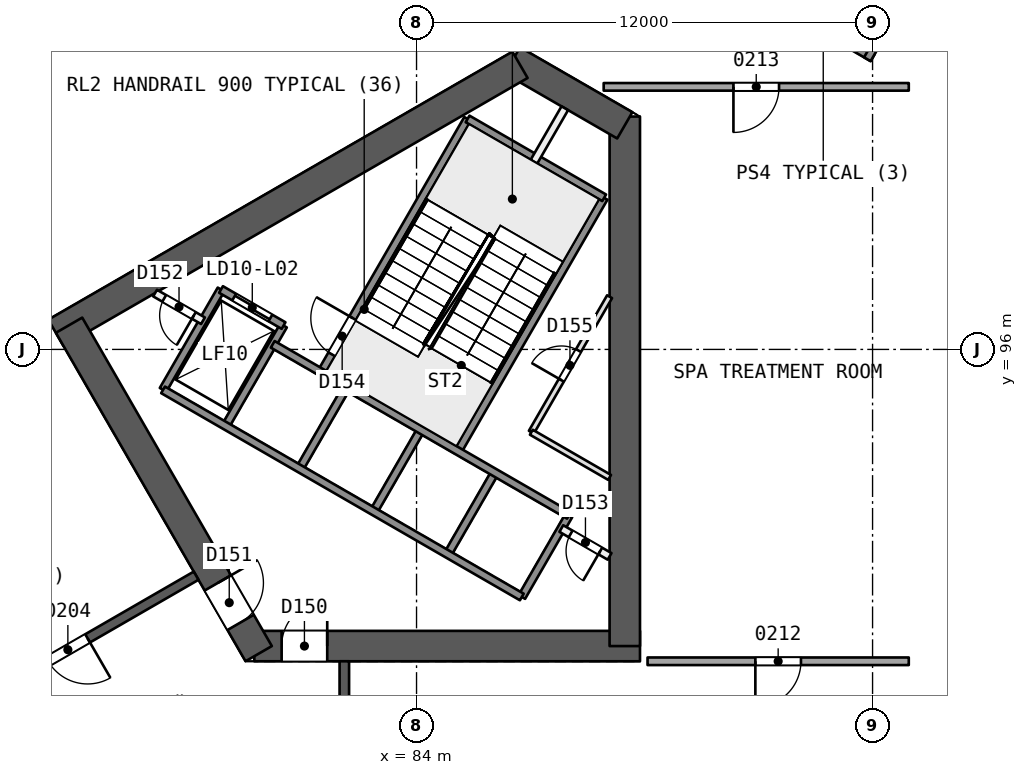
"""IFC4 building model, lengths in metres.
Left out: names, types, materials, properties, quantities, classifications, styles, units other than length and angle.
Written with IfcOpenShell. Run it as: python <this file> out.ifc"""

import sys

from ifc_helpers import new_model, si_unit, direction, frame, frame_2d, origin, place, context, subcontext, project, spatial, rectangle, extrude, element, fill, save


model = new_model("IFC4")
c1 = context("Model", 3, precision=1e-05, world=origin(), true_north=direction((0.0, 1.0)))
c2 = subcontext(c1, "Body", "Model", "MODEL_VIEW")
j1 = project(units=[si_unit("LENGTHUNIT", "METRE"), si_unit("PLANEANGLEUNIT", "RADIAN")], contexts=[c1])
p1 = place(None, origin())
s1 = spatial("IfcSite", under=j1, at=p1, CompositionType="ELEMENT")
p2 = place(p1, origin())
s2 = spatial("IfcBuilding", under=s1, at=p2, CompositionType="ELEMENT")
p3 = place(p2, frame((0.0, 0.0, 15.0)))
s3 = spatial("IfcBuildingStorey", under=s2, at=p3, CompositionType="ELEMENT", Elevation=15.0)
p4 = place(p3, frame((79.731, 88.194, 0.0), z_axis=(0.0, 0.0, 1.0), x_axis=(1.0, 0.0, 0.0)))
e1 = element("IfcWall", 1, at=p4, inside=s3, PredefinedType="SHEAR", context=c2, shape_type="SweptSolid", body=[
    extrude(rectangle(XDim=10.149, YDim=0.8, at=frame_2d((5.074, 0.0))), origin(), (0.0, 0.0, 1.0), 5.4),
])
p5 = place(p4, frame((0.719, 0.0, 0.0)))
e2 = element("IfcOpeningElement", 2, at=p5, cuts=e1, PredefinedType="OPENING", context=c2, shape_type="SweptSolid", body=[
    extrude(rectangle(XDim=1.2, YDim=2.1, at=frame_2d((0.6, 1.05))), frame((0.0, 0.411, 0.0), z_axis=(0.0, -1.0, 0.0), x_axis=(1.0, 0.0, 0.0)), (0.0, 0.0, 1.0), 0.821),
])
p6 = place(p3, frame((89.48, 88.194, 0.0), z_axis=(0.0, 0.0, 1.0), x_axis=(0.0, 1.0, 0.0)))
e3 = element("IfcWall", 3, at=p6, inside=s3, PredefinedType="SHEAR", context=c2, shape_type="SweptSolid", body=[
    extrude(rectangle(XDim=13.933, YDim=0.8, at=frame_2d((6.967, 0.0))), origin(), (0.0, 0.0, 1.0), 5.4),
])
p7 = place(p3, frame((89.48, 101.897, 0.0), z_axis=(0.0, 0.0, 1.0), x_axis=(-0.866034355626, 0.499984494636, 0.0)))
e4 = element("IfcWall", 4, at=p7, inside=s3, PredefinedType="SHEAR", context=c2, shape_type="SweptSolid", body=[
    extrude(rectangle(XDim=3.414, YDim=0.8, at=frame_2d((1.707, 0.0))), origin(), (0.0, 0.0, 1.0), 5.4),
])
p8 = place(p3, frame((86.723, 103.488, 0.0), z_axis=(0.0, 0.0, 1.0), x_axis=(-0.866032504327, -0.499987701298, 0.0)))
e5 = element("IfcWall", 5, at=p8, inside=s3, PredefinedType="SHEAR", context=c2, shape_type="SweptSolid", body=[
    extrude(rectangle(XDim=14.102, YDim=0.8, at=frame_2d((7.051, 0.0))), origin(), (0.0, 0.0, 1.0), 5.4),
])
p9 = place(p3, frame((74.856, 96.637, 0.0), z_axis=(0.0, 0.0, 1.0), x_axis=(0.499993500917, -0.866029155999, 0.0)))
e6 = element("IfcWall", 6, at=p9, inside=s3, PredefinedType="SHEAR", context=c2, shape_type="SweptSolid", body=[
    extrude(rectangle(XDim=9.98, YDim=0.8, at=frame_2d((4.99, 0.0))), origin(), (0.0, 0.0, 1.0), 5.4),
])
p10 = place(p9, frame((7.83, 0.0, 0.0)))
e7 = element("IfcOpeningElement", 7, at=p10, cuts=e6, PredefinedType="OPENING", context=c2, shape_type="SweptSolid", body=[
    extrude(rectangle(XDim=1.2, YDim=2.1, at=frame_2d((0.6, 1.05))), frame((0.0, 0.411, 0.0), z_axis=(0.0, -1.0, 0.0), x_axis=(1.0, 0.0, 0.0)), (0.0, 0.0, 1.0), 0.821),
])
p11 = place(p3, frame((82.1, 72.206, 0.0), z_axis=(0.0, 0.0, 1.0), x_axis=(0.0, 1.0, 0.0)))
e8 = element("IfcWall", 8, at=p11, inside=s3, PredefinedType="SHEAR", context=c2, shape_type="SweptSolid", body=[
    extrude(rectangle(XDim=15.588, YDim=0.25, at=frame_2d((7.794, 0.0))), origin(), (0.0, 0.0, 1.0), 5.0),
])
p12 = place(p11, frame((2.05, 0.0, 0.0)))
e9 = element("IfcOpeningElement", 9, at=p12, cuts=e8, PredefinedType="OPENING", context=c2, shape_type="SweptSolid", body=[
    extrude(rectangle(XDim=1.2, YDim=2.4, at=frame_2d((0.6, 1.2))), frame((0.0, 0.135, 0.0), z_axis=(0.0, -1.0, 0.0), x_axis=(1.0, 0.0, 0.0)), (0.0, 0.0, 1.0), 0.271),
])
p13 = place(p11, frame((7.272, 0.0, 0.0)))
e10 = element("IfcOpeningElement", 10, at=p13, cuts=e8, PredefinedType="OPENING", context=c2, shape_type="SweptSolid", body=[
    extrude(rectangle(XDim=1.2, YDim=2.4, at=frame_2d((0.6, 1.2))), frame((0.0, 0.135, 0.0), z_axis=(0.0, -1.0, 0.0), x_axis=(1.0, 0.0, 0.0)), (0.0, 0.0, 1.0), 0.271),
])
p14 = place(p11, frame((12.417, 0.0, 0.0)))
e11 = element("IfcOpeningElement", 11, at=p14, cuts=e8, PredefinedType="OPENING", context=c2, shape_type="SweptSolid", body=[
    extrude(rectangle(XDim=1.2, YDim=2.4, at=frame_2d((0.6, 1.2))), frame((0.0, 0.135, 0.0), z_axis=(0.0, -1.0, 0.0), x_axis=(1.0, 0.0, 0.0)), (0.0, 0.0, 1.0), 0.271),
])
p15 = place(p3, frame((78.2, 90.046, 0.0), z_axis=(0.0, 0.0, 1.0), x_axis=(-0.866026492143, -0.499998114903, 0.0)))
e12 = element("IfcWall", 12, at=p15, inside=s3, PredefinedType="SHEAR", context=c2, shape_type="SweptSolid", body=[
    extrude(rectangle(XDim=15.588, YDim=0.25, at=frame_2d((7.794, 0.0))), origin(), (0.0, 0.0, 1.0), 5.0),
])
p16 = place(p15, frame((3.297, 0.0, 0.0)))
e13 = element("IfcOpeningElement", 13, at=p16, cuts=e12, PredefinedType="OPENING", context=c2, shape_type="SweptSolid", body=[
    extrude(rectangle(XDim=1.2, YDim=2.4, at=frame_2d((0.6, 1.2))), frame((0.0, 0.135, 0.0), z_axis=(0.0, -1.0, 0.0), x_axis=(1.0, 0.0, 0.0)), (0.0, 0.0, 1.0), 0.271),
])
p17 = place(p15, frame((8.046, 0.0, 0.0)))
e14 = element("IfcOpeningElement", 14, at=p17, cuts=e12, PredefinedType="OPENING", context=c2, shape_type="SweptSolid", body=[
    extrude(rectangle(XDim=0.9, YDim=2.1, at=frame_2d((0.45, 1.05))), frame((0.0, 0.135, 0.0), z_axis=(0.0, -1.0, 0.0), x_axis=(1.0, 0.0, 0.0)), (0.0, 0.0, 1.0), 0.271),
])
p18 = place(p15, frame((9.449, 0.0, 0.0)))
e15 = element("IfcOpeningElement", 15, at=p18, cuts=e12, PredefinedType="OPENING", context=c2, shape_type="SweptSolid", body=[
    extrude(rectangle(XDim=0.9, YDim=2.1, at=frame_2d((0.45, 1.05))), frame((0.0, 0.135, 0.0), z_axis=(0.0, -1.0, 0.0), x_axis=(1.0, 0.0, 0.0)), (0.0, 0.0, 1.0), 0.271),
])
p19 = place(p15, frame((11.085, 0.0, 0.0)))
e16 = element("IfcOpeningElement", 16, at=p19, cuts=e12, PredefinedType="OPENING", context=c2, shape_type="SweptSolid", body=[
    extrude(rectangle(XDim=0.9, YDim=2.1, at=frame_2d((0.45, 1.05))), frame((0.0, 0.135, 0.0), z_axis=(0.0, -1.0, 0.0), x_axis=(1.0, 0.0, 0.0)), (0.0, 0.0, 1.0), 0.271),
])
p20 = place(p15, frame((13.43, 0.0, 0.0)))
e17 = element("IfcOpeningElement", 17, at=p20, cuts=e12, PredefinedType="OPENING", context=c2, shape_type="SweptSolid", body=[
    extrude(rectangle(XDim=1.2, YDim=2.4, at=frame_2d((0.6, 1.2))), frame((0.0, 0.135, 0.0), z_axis=(0.0, -1.0, 0.0), x_axis=(1.0, 0.0, 0.0)), (0.0, 0.0, 1.0), 0.271),
])
p21 = place(p3, frame((96.953, 87.794, 0.0), z_axis=(0.0, 0.0, 1.0), x_axis=(-1.0, 0.0, 0.0)))
e18 = element("IfcWall", 18, at=p21, inside=s3, PredefinedType="PARTITIONING", context=c2, shape_type="SweptSolid", body=[
    extrude(rectangle(XDim=6.874, YDim=0.2, at=frame_2d((3.437, 0.0))), origin(), (0.0, 0.0, 1.0), 5.0),
])
p22 = place(p21, frame((2.837, 0.0, 0.0)))
e19 = element("IfcOpeningElement", 19, at=p22, cuts=e18, PredefinedType="OPENING", context=c2, shape_type="SweptSolid", body=[
    extrude(rectangle(XDim=1.2, YDim=2.4, at=frame_2d((0.6, 1.2))), frame((0.0, 0.11, 0.0), z_axis=(0.0, -1.0, 0.0), x_axis=(1.0, 0.0, 0.0)), (0.0, 0.0, 1.0), 0.221),
])
p23 = place(p3, frame((96.953, 102.909, 0.0), z_axis=(0.0, 0.0, 1.0), x_axis=(-1.0, 0.0, 0.0)))
e20 = element("IfcWall", 20, at=p23, inside=s3, PredefinedType="PARTITIONING", context=c2, shape_type="SweptSolid", body=[
    extrude(rectangle(XDim=8.028, YDim=0.2, at=frame_2d((4.014, 0.0))), origin(), (0.0, 0.0, 1.0), 5.0),
])
p24 = place(p23, frame((3.414, 0.0, 0.0)))
e21 = element("IfcOpeningElement", 21, at=p24, cuts=e20, PredefinedType="OPENING", context=c2, shape_type="SweptSolid", body=[
    extrude(rectangle(XDim=1.2, YDim=2.4, at=frame_2d((0.6, 1.2))), frame((0.0, 0.11, 0.0), z_axis=(0.0, -1.0, 0.0), x_axis=(1.0, 0.0, 0.0)), (0.0, 0.0, 1.0), 0.221),
])
p25 = place(p3, frame((26.66, 85.0, 0.0), z_axis=(0.0, 0.0, 1.0), x_axis=(0.866025599265, 0.499999661418, 0.0)))
e22 = element("IfcWall", 22, at=p25, inside=s3, PredefinedType="SOLIDWALL", context=c2, shape_type="SweptSolid", body=[
    extrude(rectangle(XDim=78.727, YDim=0.4, at=frame_2d((39.364, 0.0))), origin(), (0.0, 0.0, 1.0), 5.0),
])
p26 = place(p25, frame((42.061, 0.0, 0.9)))
e23 = element("IfcOpeningElement", 23, at=p26, cuts=e22, PredefinedType="OPENING", context=c2, shape_type="SweptSolid", body=[
    extrude(rectangle(XDim=2.4, YDim=2.4, at=frame_2d((1.2, 1.2))), frame((0.0, 0.21, 0.0), z_axis=(0.0, -1.0, 0.0), x_axis=(1.0, 0.0, 0.0)), (0.0, 0.0, 1.0), 0.421),
])
p27 = place(p25, frame((34.267, 0.0, 0.9)))
e24 = element("IfcOpeningElement", 24, at=p27, cuts=e22, PredefinedType="OPENING", context=c2, shape_type="SweptSolid", body=[
    extrude(rectangle(XDim=2.4, YDim=2.4, at=frame_2d((1.2, 1.2))), frame((0.0, 0.21, 0.0), z_axis=(0.0, -1.0, 0.0), x_axis=(1.0, 0.0, 0.0)), (0.0, 0.0, 1.0), 0.421),
])
p28 = place(p3, frame((86.77, 89.486, 0.0), z_axis=(0.0, 0.0, 1.0), x_axis=(0.499961042966, 0.86604789447, 0.0)))
e25 = element("IfcWall", 25, at=p28, inside=s3, PredefinedType="SOLIDWALL", context=c2, shape_type="SweptSolid", body=[
    extrude(rectangle(XDim=2.48, YDim=0.2, at=frame_2d((1.24, 0.0))), origin(), (0.0, 0.0, 1.0), 5.0),
])
p29 = place(p3, frame((87.021, 93.821, 0.0), z_axis=(0.0, 0.0, 1.0), x_axis=(0.500028662945, 0.866008854593, 0.0)))
e26 = element("IfcWall", 26, at=p29, inside=s3, PredefinedType="PARTITIONING", context=c2, shape_type="SweptSolid", body=[
    extrude(rectangle(XDim=4.118, YDim=0.15, at=frame_2d((2.059, 0.0))), origin(), (0.0, 0.0, 1.0), 5.0),
])
p30 = place(p29, frame((1.582, 0.0, 0.0)))
e27 = element("IfcOpeningElement", 27, at=p30, cuts=e26, PredefinedType="OPENING", context=c2, shape_type="SweptSolid", body=[
    extrude(rectangle(XDim=0.9, YDim=2.1, at=frame_2d((0.45, 1.05))), frame((0.0, 0.085, 0.0), z_axis=(0.0, -1.0, 0.0), x_axis=(1.0, 0.0, 0.0)), (0.0, 0.0, 1.0), 0.171),
])
p31 = place(p3, frame((84.821, 90.611, 0.0), z_axis=(0.0, 0.0, 1.0), x_axis=(0.499961042966, 0.86604789447, 0.0)))
e28 = element("IfcWall", 28, at=p31, inside=s3, PredefinedType="SOLIDWALL", context=c2, shape_type="SweptSolid", body=[
    extrude(rectangle(XDim=2.48, YDim=0.2, at=frame_2d((1.24, 0.0))), origin(), (0.0, 0.0, 1.0), 5.0),
])
p32 = place(p3, frame((85.087, 93.321, 0.0), z_axis=(0.0, 0.0, 1.0), x_axis=(0.500019787375, 0.866013979237, 0.0)))
e29 = element("IfcWall", 29, at=p32, inside=s3, PredefinedType="SOLIDWALL", context=c2, shape_type="SweptSolid", body=[
    extrude(rectangle(XDim=7.7, YDim=0.2, at=frame_2d((3.85, 0.0))), origin(), (0.0, 0.0, 1.0), 5.0),
])
p33 = place(p3, frame((82.873, 91.736, 0.0), z_axis=(0.0, 0.0, 1.0), x_axis=(0.499961042966, 0.86604789447, 0.0)))
e30 = element("IfcWall", 30, at=p33, inside=s3, PredefinedType="SOLIDWALL", context=c2, shape_type="SweptSolid", body=[
    extrude(rectangle(XDim=2.48, YDim=0.2, at=frame_2d((1.24, 0.0))), origin(), (0.0, 0.0, 1.0), 5.0),
])
p34 = place(p3, frame((87.09, 100.94, 0.0), z_axis=(0.0, 0.0, 1.0), x_axis=(0.499956811548, 0.866050337213, 0.0)))
e31 = element("IfcWall", 31, at=p34, inside=s3, PredefinedType="PARTITIONING", context=c2, shape_type="SweptSolid", body=[
    extrude(rectangle(XDim=1.623, YDim=0.2, at=frame_2d((0.812, 0.0))), origin(), (0.0, 0.0, 1.0), 5.0),
])
p35 = place(p3, frame((80.924, 92.861, 0.0), z_axis=(0.0, 0.0, 1.0), x_axis=(0.499961042966, 0.86604789447, 0.0)))
e32 = element("IfcWall", 32, at=p35, inside=s3, PredefinedType="SOLIDWALL", context=c2, shape_type="SweptSolid", body=[
    extrude(rectangle(XDim=2.48, YDim=0.2, at=frame_2d((1.24, 0.0))), origin(), (0.0, 0.0, 1.0), 5.0),
])
p36 = place(p3, frame((81.493, 95.396, 0.0), z_axis=(0.0, 0.0, 1.0), x_axis=(0.500006057782, 0.866021906294, 0.0)))
e33 = element("IfcWall", 33, at=p36, inside=s3, PredefinedType="SOLIDWALL", context=c2, shape_type="SweptSolid", body=[
    extrude(rectangle(XDim=7.7, YDim=0.2, at=frame_2d((3.85, 0.0))), origin(), (0.0, 0.0, 1.0), 5.0),
])
p37 = place(p36, frame((0.55, 0.0, 0.0)))
e34 = element("IfcOpeningElement", 34, at=p37, cuts=e33, PredefinedType="OPENING", context=c2, shape_type="SweptSolid", body=[
    extrude(rectangle(XDim=1.1, YDim=2.1, at=frame_2d((0.55, 1.05))), frame((0.0, 0.11, 0.0), z_axis=(0.0, -1.0, 0.0), x_axis=(1.0, 0.0, 0.0)), (0.0, 0.0, 1.0), 0.221),
])
for number, where, z_axis, x_axis in (
    (35, (78.976, 93.986, 0.0), (0.0, 0.0, 1.0), (0.5, 0.866, 0.0)),
    (36, (77.33, 94.936, 0.0), (0.0, 0.0, 1.0), (0.5, 0.866, 0.0)),
):
    element("IfcWall", number, at=place(p3, frame(where, z_axis=z_axis, x_axis=x_axis)), inside=s3, PredefinedType="SOLIDWALL", context=c2, shape_type="SweptSolid", body=[
        extrude(rectangle(XDim=3.05, YDim=0.2, at=frame_2d((1.525, 0.0))), origin(), (0.0, 0.0, 1.0), 5.0),
    ])
p38 = place(p3, frame((86.77, 89.486, 0.0), z_axis=(0.0, 0.0, 1.0), x_axis=(-0.86601811187, 0.500012629753, 0.0)))
e37 = element("IfcWall", 37, at=p38, inside=s3, PredefinedType="SOLIDWALL", context=c2, shape_type="SweptSolid", body=[
    extrude(rectangle(XDim=10.9, YDim=0.2, at=frame_2d((5.45, 0.0))), origin(), (0.0, 0.0, 1.0), 5.0),
])
p39 = place(p3, frame((89.08, 90.554, 0.0), z_axis=(0.0, 0.0, 1.0), x_axis=(-0.866022048785, 0.500005810984, 0.0)))
e38 = element("IfcWall", 38, at=p39, inside=s3, PredefinedType="PARTITIONING", context=c2, shape_type="SweptSolid", body=[
    extrude(rectangle(XDim=1.467, YDim=0.2, at=frame_2d((0.733, 0.0))), origin(), (0.0, 0.0, 1.0), 5.0),
])
p40 = place(p39, frame((0.283, 0.0, 0.0)))
e39 = element("IfcOpeningElement", 39, at=p40, cuts=e38, PredefinedType="OPENING", context=c2, shape_type="SweptSolid", body=[
    extrude(rectangle(XDim=0.9, YDim=2.1, at=frame_2d((0.45, 1.05))), frame((0.0, 0.11, 0.0), z_axis=(0.0, -1.0, 0.0), x_axis=(1.0, 0.0, 0.0)), (0.0, 0.0, 1.0), 0.221),
])
p41 = place(p3, frame((78.38, 96.755, 0.0), z_axis=(0.0, 0.0, 1.0), x_axis=(-0.866003949776, 0.500037157592, 0.0)))
e40 = element("IfcWall", 40, at=p41, inside=s3, PredefinedType="PARTITIONING", context=c2, shape_type="SweptSolid", body=[
    extrude(rectangle(XDim=1.455, YDim=0.2, at=frame_2d((0.728, 0.0))), origin(), (0.0, 0.0, 1.0), 5.0),
])
p42 = place(p41, frame((0.278, 0.0, 0.0)))
e41 = element("IfcOpeningElement", 41, at=p42, cuts=e40, PredefinedType="OPENING", context=c2, shape_type="SweptSolid", body=[
    extrude(rectangle(XDim=0.9, YDim=2.1, at=frame_2d((0.45, 1.05))), frame((0.0, 0.11, 0.0), z_axis=(0.0, -1.0, 0.0), x_axis=(1.0, 0.0, 0.0)), (0.0, 0.0, 1.0), 0.221),
])
p43 = place(p3, frame((88.01, 91.634, 0.0), z_axis=(0.0, 0.0, 1.0), x_axis=(-0.866024315419, 0.5000018851, 0.0)))
e42 = element("IfcWall", 42, at=p43, inside=s3, PredefinedType="SOLIDWALL", context=c2, shape_type="SweptSolid", body=[
    extrude(rectangle(XDim=9.0, YDim=0.2, at=frame_2d((4.5, 0.0))), origin(), (0.0, 0.0, 1.0), 5.0),
])
p44 = place(p3, frame((80.5, 96.627, 0.0), z_axis=(0.0, 0.0, 1.0), x_axis=(-0.86601224135, 0.500022797313, 0.0)))
e43 = element("IfcWall", 43, at=p44, inside=s3, PredefinedType="SOLIDWALL", context=c2, shape_type="SweptSolid", body=[
    extrude(rectangle(XDim=1.9, YDim=0.2, at=frame_2d((0.95, 0.0))), origin(), (0.0, 0.0, 1.0), 5.0),
])
p45 = place(p44, frame((0.4, 0.0, 0.0)))
e44 = element("IfcOpeningElement", 44, at=p45, cuts=e43, PredefinedType="OPENING", context=c2, shape_type="SweptSolid", body=[
    extrude(rectangle(XDim=1.1, YDim=2.1, at=frame_2d((0.55, 1.05))), frame((0.0, 0.11, 0.0), z_axis=(0.0, -1.0, 0.0), x_axis=(1.0, 0.0, 0.0)), (0.0, 0.0, 1.0), 0.221),
])
p46 = place(p3, frame((89.08, 92.632, 0.0), z_axis=(0.0, 0.0, 1.0), x_axis=(-0.866041951395, 0.499971337603, 0.0)))
e45 = element("IfcWall", 45, at=p46, inside=s3, PredefinedType="PARTITIONING", context=c2, shape_type="SweptSolid", body=[
    extrude(rectangle(XDim=2.378, YDim=0.15, at=frame_2d((1.189, 0.0))), origin(), (0.0, 0.0, 1.0), 5.0),
])
p47 = place(p3, frame((88.937, 99.99, 0.0), z_axis=(0.0, 0.0, 1.0), x_axis=(-0.866004344652, 0.500036473714, 0.0)))
e46 = element("IfcWall", 46, at=p47, inside=s3, PredefinedType="SOLIDWALL", context=c2, shape_type="SweptSolid", body=[
    extrude(rectangle(XDim=4.15, YDim=0.2, at=frame_2d((2.075, 0.0))), origin(), (0.0, 0.0, 1.0), 5.0),
])
p48 = place(p3, frame((92.189, 105.872, -0.4), z_axis=(0.0, 0.0, 1.0), x_axis=(0.866032203192, -0.499988222896, 0.0)))
e47 = element("IfcWall", 47, at=p48, inside=s3, PredefinedType="SOLIDWALL", context=c2, shape_type="SweptSolid", body=[
    extrude(rectangle(XDim=4.4, YDim=0.2, at=frame_2d((2.2, 0.0))), origin(), (0.0, 0.0, 1.0), 5.4),
])
p49 = place(p3, frame((95.863, 103.635, -0.4), z_axis=(0.0, 0.0, 1.0), x_axis=(0.49999894854, 0.866026010844, 0.0)))
e48 = element("IfcWall", 48, at=p49, inside=s3, PredefinedType="SOLIDWALL", context=c2, shape_type="SweptSolid", body=[
    extrude(rectangle(XDim=8.0, YDim=0.2, at=frame_2d((4.0, 0.0))), origin(), (0.0, 0.0, 1.0), 5.4),
])
p50 = place(p16, origin())
e49 = element("IfcDoor", 49, at=p50, inside=s3, OperationType="SINGLE_SWING_LEFT", PredefinedType="NOTDEFINED", context=c2, shape_type="SweptSolid", body=[
    extrude(rectangle(XDim=1.2, YDim=2.4, at=frame_2d((0.6, 1.2))), frame((0.0, 0.025, 0.0), z_axis=(0.0, -1.0, 0.0), x_axis=(1.0, 0.0, 0.0)), (0.0, 0.0, 1.0), 0.05),
])
fill(e13, e49)
p51 = place(p22, origin())
e50 = element("IfcDoor", 50, at=p51, inside=s3, OperationType="SINGLE_SWING_RIGHT", PredefinedType="NOTDEFINED", context=c2, shape_type="SweptSolid", body=[
    extrude(rectangle(XDim=1.2, YDim=2.4, at=frame_2d((0.6, 1.2))), frame((0.0, 0.025, 0.0), z_axis=(0.0, -1.0, 0.0), x_axis=(1.0, 0.0, 0.0)), (0.0, 0.0, 1.0), 0.05),
])
fill(e19, e50)
p52 = place(p24, origin())
e51 = element("IfcDoor", 51, at=p52, inside=s3, OperationType="SINGLE_SWING_RIGHT", PredefinedType="NOTDEFINED", context=c2, shape_type="SweptSolid", body=[
    extrude(rectangle(XDim=1.2, YDim=2.4, at=frame_2d((0.6, 1.2))), frame((0.0, 0.025, 0.0), z_axis=(0.0, -1.0, 0.0), x_axis=(1.0, 0.0, 0.0)), (0.0, 0.0, 1.0), 0.05),
])
fill(e21, e51)
p53 = place(p5, origin())
e52 = element("IfcDoor", 52, at=p53, inside=s3, OperationType="SINGLE_SWING_RIGHT", PredefinedType="NOTDEFINED", context=c2, shape_type="SweptSolid", body=[
    extrude(rectangle(XDim=1.2, YDim=2.1, at=frame_2d((0.6, 1.05))), frame((0.0, 0.025, 0.0), z_axis=(0.0, -1.0, 0.0), x_axis=(1.0, 0.0, 0.0)), (0.0, 0.0, 1.0), 0.05),
])
fill(e2, e52)
p54 = place(p10, origin())
e53 = element("IfcDoor", 53, at=p54, inside=s3, OperationType="SINGLE_SWING_LEFT", PredefinedType="NOTDEFINED", context=c2, shape_type="SweptSolid", body=[
    extrude(rectangle(XDim=1.2, YDim=2.1, at=frame_2d((0.6, 1.05))), frame((0.0, 0.025, 0.0), z_axis=(0.0, -1.0, 0.0), x_axis=(1.0, 0.0, 0.0)), (0.0, 0.0, 1.0), 0.05),
])
fill(e7, e53)
p55 = place(p45, origin())
e54 = element("IfcDoor", 54, at=p55, inside=s3, OperationType="SLIDING_TO_RIGHT", PredefinedType="NOTDEFINED", context=c2, shape_type="SweptSolid", body=[
    extrude(rectangle(XDim=1.1, YDim=2.1, at=frame_2d((0.55, 1.05))), frame((0.0, 0.025, 0.0), z_axis=(0.0, -1.0, 0.0), x_axis=(1.0, 0.0, 0.0)), (0.0, 0.0, 1.0), 0.05),
])
fill(e44, e54)
p56 = place(p42, origin())
e55 = element("IfcDoor", 55, at=p56, inside=s3, OperationType="SINGLE_SWING_LEFT", PredefinedType="NOTDEFINED", context=c2, shape_type="SweptSolid", body=[
    extrude(rectangle(XDim=0.9, YDim=2.1, at=frame_2d((0.45, 1.05))), frame((0.0, 0.025, 0.0), z_axis=(0.0, -1.0, 0.0), x_axis=(1.0, 0.0, 0.0)), (0.0, 0.0, 1.0), 0.05),
])
fill(e41, e55)
p57 = place(p40, origin())
e56 = element("IfcDoor", 56, at=p57, inside=s3, OperationType="SINGLE_SWING_LEFT", PredefinedType="NOTDEFINED", context=c2, shape_type="SweptSolid", body=[
    extrude(rectangle(XDim=0.9, YDim=2.1, at=frame_2d((0.45, 1.05))), frame((0.0, 0.025, 0.0), z_axis=(0.0, -1.0, 0.0), x_axis=(1.0, 0.0, 0.0)), (0.0, 0.0, 1.0), 0.05),
])
fill(e39, e56)
p58 = place(p37, origin())
e57 = element("IfcDoor", 57, at=p58, inside=s3, OperationType="SINGLE_SWING_RIGHT", PredefinedType="NOTDEFINED", context=c2, shape_type="SweptSolid", body=[
    extrude(rectangle(XDim=1.1, YDim=2.1, at=frame_2d((0.55, 1.05))), frame((0.0, 0.025, 0.0), z_axis=(0.0, -1.0, 0.0), x_axis=(1.0, 0.0, 0.0)), (0.0, 0.0, 1.0), 0.05),
])
fill(e34, e57)
p59 = place(p30, origin())
e58 = element("IfcDoor", 58, at=p59, inside=s3, OperationType="SINGLE_SWING_LEFT", PredefinedType="NOTDEFINED", context=c2, shape_type="SweptSolid", body=[
    extrude(rectangle(XDim=0.9, YDim=2.1, at=frame_2d((0.45, 1.05))), frame((0.0, 0.025, 0.0), z_axis=(0.0, -1.0, 0.0), x_axis=(1.0, 0.0, 0.0)), (0.0, 0.0, 1.0), 0.05),
])
fill(e27, e58)
save(model, sys.argv[1])
